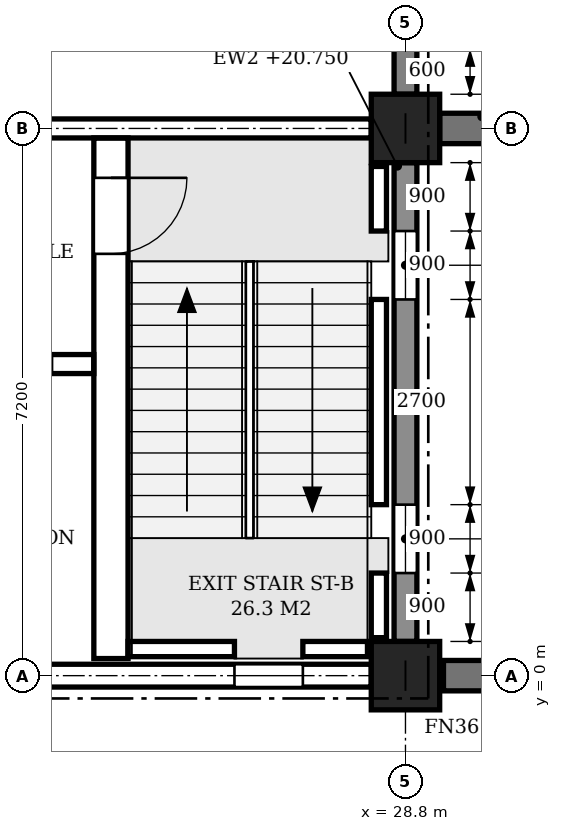
"""IFC4 building model, lengths in metres.
Left out: names, types, materials, properties, quantities, classifications, styles, units other than length and angle.
Written with IfcOpenShell. Run it as: python <this file> out.ifc"""

import sys

from ifc_helpers import new_model, si_unit, direction, frame, frame_2d, origin, origin_2d, place, context, subcontext, project, spatial, polyline, rectangle, outline, extrude, element, fill, save


model = new_model("IFC4")
c1 = context("Model", 3, precision=1e-05, world=origin(), true_north=direction((0.0, 1.0)))
c2 = subcontext(c1, "Body", "Model", "MODEL_VIEW")
j1 = project(units=[si_unit("LENGTHUNIT", "METRE"), si_unit("PLANEANGLEUNIT", "RADIAN")], contexts=[c1])
p1 = place(None, origin())
s1 = spatial("IfcSite", under=j1, at=p1, CompositionType="ELEMENT")
p2 = place(p1, origin())
s2 = spatial("IfcBuilding", under=s1, at=p2, CompositionType="ELEMENT")
p3 = place(p2, frame((0.0, 0.0, 16.8)))
s3 = spatial("IfcBuildingStorey", under=s2, at=p3, CompositionType="ELEMENT", Elevation=16.8)
for number, where, z_axis, x_axis in (
    (1, (28.8, 0.0, 0.0), (0.0, 0.0, 1.0), (1.0, 0.0, 0.0)),
    (2, (28.8, 7.2, 0.0), (0.0, 0.0, 1.0), (1.0, 0.0, 0.0)),
):
    element("IfcColumn", number, at=place(p3, frame(where, z_axis=z_axis, x_axis=x_axis)), inside=s3, PredefinedType="COLUMN", context=c2, shape_type="SweptSolid", body=[
        extrude(rectangle(XDim=0.9, YDim=0.9, at=origin_2d()), origin(), (0.0, 0.0, 1.0), 4.8),
    ])
p4 = place(p3, frame((22.05, 0.0, 0.0), z_axis=(0.0, 0.0, 1.0), x_axis=(1.0, 0.0, 0.0)))
e3 = element("IfcWall", 3, at=p4, inside=s3, PredefinedType="STANDARD", context=c2, shape_type="SweptSolid", body=[
    extrude(rectangle(XDim=6.3, YDim=0.3, at=frame_2d((3.15, 0.0))), origin(), (0.0, 0.0, 1.0), 3.95),
])
p5 = place(p4, frame((4.5, 0.0, 0.9)))
e4 = element("IfcOpeningElement", 4, at=p5, cuts=e3, PredefinedType="OPENING", context=c2, shape_type="SweptSolid", body=[
    extrude(outline(polyline([(0.0, 0.0), (0.9, 0.0), (0.9, 2.05), (0.45, 2.5), (0.0, 2.05), (0.0, 0.0)])), frame((0.0, 0.16, 0.0), z_axis=(0.0, -1.0, 0.0), x_axis=(1.0, 0.0, 0.0)), (0.0, 0.0, 1.0), 0.32),
])
p6 = place(p3, frame((28.8, 0.45, 0.0), z_axis=(0.0, 0.0, 1.0), x_axis=(0.0, 1.0, 0.0)))
e5 = element("IfcWall", 5, at=p6, inside=s3, PredefinedType="STANDARD", context=c2, shape_type="SweptSolid", body=[
    extrude(rectangle(XDim=6.3, YDim=0.3, at=frame_2d((3.15, 0.0))), origin(), (0.0, 0.0, 1.0), 3.95),
])
p7 = place(p6, frame((0.9, 0.0, 0.9)))
e6 = element("IfcOpeningElement", 6, at=p7, cuts=e5, PredefinedType="OPENING", context=c2, shape_type="SweptSolid", body=[
    extrude(outline(polyline([(0.0, 0.0), (0.9, 0.0), (0.9, 2.05), (0.45, 2.5), (0.0, 2.05), (0.0, 0.0)])), frame((0.0, 0.16, 0.0), z_axis=(0.0, -1.0, 0.0), x_axis=(1.0, 0.0, 0.0)), (0.0, 0.0, 1.0), 0.32),
])
p8 = place(p6, frame((4.5, 0.0, 0.9)))
e7 = element("IfcOpeningElement", 7, at=p8, cuts=e5, PredefinedType="OPENING", context=c2, shape_type="SweptSolid", body=[
    extrude(outline(polyline([(0.0, 0.0), (0.9, 0.0), (0.9, 2.05), (0.45, 2.5), (0.0, 2.05), (0.0, 0.0)])), frame((0.0, 0.16, 0.0), z_axis=(0.0, -1.0, 0.0), x_axis=(1.0, 0.0, 0.0)), (0.0, 0.0, 1.0), 0.32),
])
p9 = place(p3, frame((28.8, 7.65, 0.0), z_axis=(0.0, 0.0, 1.0), x_axis=(0.0, 1.0, 0.0)))
e8 = element("IfcWall", 8, at=p9, inside=s3, PredefinedType="STANDARD", context=c2, shape_type="SweptSolid", body=[
    extrude(rectangle(XDim=6.3, YDim=0.3, at=frame_2d((3.15, 0.0))), origin(), (0.0, 0.0, 1.0), 3.95),
])
p10 = place(p9, frame((0.6, 0.0, 0.9)))
e9 = element("IfcOpeningElement", 9, at=p10, cuts=e8, PredefinedType="OPENING", context=c2, shape_type="SweptSolid", body=[
    extrude(outline(polyline([(0.0, 0.0), (1.5, 0.0), (1.5, 1.75), (0.75, 2.5), (0.0, 1.75), (0.0, 0.0)])), frame((0.0, 0.16, 0.0), z_axis=(0.0, -1.0, 0.0), x_axis=(1.0, 0.0, 0.0)), (0.0, 0.0, 1.0), 0.32),
])
for number, where, z_axis, x_axis in (
    (10, (29.3, 0.0, 0.0), (0.0, 0.0, 1.0), (1.0, 0.0, 0.0)),
    (11, (29.25, 7.2, 0.0), (0.0, 0.0, 1.0), (1.0, 0.0, 0.0)),
):
    element("IfcWall", number, at=place(p3, frame(where, z_axis=z_axis, x_axis=x_axis)), inside=s3, PredefinedType="POLYGONAL", context=c2, shape_type="SweptSolid", body=[
        extrude(outline(polyline([(0.6, 0.0), (0.6, 4.55), (0.0, 4.55), (0.0, 0.0), (0.6, 0.0)])), frame((0.0, 0.2, 0.0), z_axis=(0.0, -1.0, 0.0), x_axis=(1.0, 0.0, 0.0)), (0.0, 0.0, 1.0), 0.4),
    ])
p11 = place(p3, frame((22.05, 7.2, 0.0), z_axis=(0.0, 0.0, 1.0), x_axis=(1.0, 0.0, 0.0)))
e12 = element("IfcWall", 12, at=p11, inside=s3, PredefinedType="SHEAR", context=c2, shape_type="SweptSolid", body=[
    extrude(rectangle(XDim=6.3, YDim=0.25, at=frame_2d((3.15, 0.0))), origin(), (0.0, 0.0, 1.0), 3.8),
])
p12 = place(p11, frame((0.4, 0.0, 0.0)))
e13 = element("IfcOpeningElement", 13, at=p12, cuts=e12, PredefinedType="OPENING", context=c2, shape_type="SweptSolid", body=[
    extrude(rectangle(XDim=1.1, YDim=2.1, at=frame_2d((0.55, 1.05))), frame((0.0, 0.135, 0.0), z_axis=(0.0, -1.0, 0.0), x_axis=(1.0, 0.0, 0.0)), (0.0, 0.0, 1.0), 0.27),
])
p13 = place(p3, frame((28.45, 0.5, -0.25), z_axis=(0.0, 0.0, 1.0), x_axis=(0.0, 1.0, 0.0)))
e14 = element("IfcWall", 14, at=p13, inside=s3, PredefinedType="SHEAR", context=c2, shape_type="SweptSolid", body=[
    extrude(rectangle(XDim=0.85, YDim=0.2, at=frame_2d((0.425, 0.0))), origin(), (0.0, 0.0, 1.0), 4.8),
])
p14 = place(p3, frame((28.45, 2.25, -0.25), z_axis=(0.0, 0.0, 1.0), x_axis=(0.0, 1.0, 0.0)))
e15 = element("IfcWall", 15, at=p14, inside=s3, PredefinedType="SHEAR", context=c2, shape_type="SweptSolid", body=[
    extrude(rectangle(XDim=2.7, YDim=0.2, at=frame_2d((1.35, 0.0))), origin(), (0.0, 0.0, 1.0), 4.8),
])
p15 = place(p3, frame((28.45, 5.85, -0.25), z_axis=(0.0, 0.0, 1.0), x_axis=(0.0, 1.0, 0.0)))
e16 = element("IfcWall", 16, at=p15, inside=s3, PredefinedType="SHEAR", context=c2, shape_type="SweptSolid", body=[
    extrude(rectangle(XDim=0.85, YDim=0.2, at=frame_2d((0.425, 0.0))), origin(), (0.0, 0.0, 1.0), 4.8),
])
p16 = place(p3, frame((25.15, 0.35, -0.25), z_axis=(0.0, 0.0, 1.0), x_axis=(1.0, 0.0, 0.0)))
e17 = element("IfcWall", 17, at=p16, inside=s3, PredefinedType="SHEAR", context=c2, shape_type="SweptSolid", body=[
    extrude(rectangle(XDim=1.4, YDim=0.2, at=frame_2d((0.7, 0.0))), origin(), (0.0, 0.0, 1.0), 4.8),
])
p17 = place(p3, frame((27.45, 0.35, -0.25), z_axis=(0.0, 0.0, 1.0), x_axis=(1.0, 0.0, 0.0)))
e18 = element("IfcWall", 18, at=p17, inside=s3, PredefinedType="SHEAR", context=c2, shape_type="SweptSolid", body=[
    extrude(rectangle(XDim=0.85, YDim=0.2, at=frame_2d((0.425, 0.0))), origin(), (0.0, 0.0, 1.0), 4.8),
])
p18 = place(p3, frame((24.925, 0.225, 0.0), z_axis=(0.0, 0.0, 1.0), x_axis=(0.0, 1.0, 0.0)))
e19 = element("IfcWall", 19, at=p18, inside=s3, PredefinedType="SHEAR", context=c2, shape_type="SweptSolid", body=[
    extrude(rectangle(XDim=6.85, YDim=0.45, at=frame_2d((3.425, 0.0))), origin(), (0.0, 0.0, 1.0), 4.55),
])
p19 = place(p18, frame((5.325, 0.0, 0.0)))
e20 = element("IfcOpeningElement", 20, at=p19, cuts=e19, PredefinedType="OPENING", context=c2, shape_type="SweptSolid", body=[
    extrude(rectangle(XDim=1.0, YDim=2.1, at=frame_2d((0.5, 1.05))), frame((0.0, 0.235, 0.0), z_axis=(0.0, -1.0, 0.0), x_axis=(1.0, 0.0, 0.0)), (0.0, 0.0, 1.0), 0.47),
])
p20 = place(p3, frame((21.725, 4.1, 0.0), z_axis=(0.0, 0.0, 1.0), x_axis=(1.0, 0.0, 0.0)))
e21 = element("IfcWall", 21, at=p20, inside=s3, PredefinedType="SHEAR", context=c2, shape_type="SweptSolid", body=[
    extrude(rectangle(XDim=2.975, YDim=0.25, at=frame_2d((1.487, 0.0))), origin(), (0.0, 0.0, 1.0), 4.55),
])
p21 = place(p20, frame((1.525, 0.0, 0.0)))
e22 = element("IfcOpeningElement", 22, at=p21, cuts=e21, PredefinedType="OPENING", context=c2, shape_type="SweptSolid", body=[
    extrude(rectangle(XDim=0.9, YDim=2.1, at=frame_2d((0.45, 1.05))), frame((0.0, 0.135, 0.0), z_axis=(0.0, -1.0, 0.0), x_axis=(1.0, 0.0, 0.0)), (0.0, 0.0, 1.0), 0.27),
])
p22 = place(p7, origin())
e23 = element("IfcWindow", 23, at=p22, inside=s3, PartitioningType="SINGLE_PANEL", PredefinedType="WINDOW", context=c2, shape_type="SweptSolid", body=[
    extrude(outline(polyline([(0.0, 0.0), (0.9, 0.0), (0.9, 2.05), (0.45, 2.5), (0.0, 2.05), (0.0, 0.0)])), frame((0.0, 0.03, 0.0), z_axis=(0.0, -1.0, 0.0), x_axis=(1.0, 0.0, 0.0)), (0.0, 0.0, 1.0), 0.06),
])
fill(e6, e23)
p23 = place(p8, origin())
e24 = element("IfcWindow", 24, at=p23, inside=s3, PartitioningType="SINGLE_PANEL", PredefinedType="WINDOW", context=c2, shape_type="SweptSolid", body=[
    extrude(outline(polyline([(0.0, 0.0), (0.9, 0.0), (0.9, 2.05), (0.45, 2.5), (0.0, 2.05), (0.0, 0.0)])), frame((0.0, 0.03, 0.0), z_axis=(0.0, -1.0, 0.0), x_axis=(1.0, 0.0, 0.0)), (0.0, 0.0, 1.0), 0.06),
])
fill(e7, e24)
p24 = place(p5, origin())
e25 = element("IfcWindow", 25, at=p24, inside=s3, PartitioningType="SINGLE_PANEL", PredefinedType="WINDOW", context=c2, shape_type="SweptSolid", body=[
    extrude(outline(polyline([(0.0, 0.0), (0.9, 0.0), (0.9, 2.05), (0.45, 2.5), (0.0, 2.05), (0.0, 0.0)])), frame((0.0, 0.03, 0.0), z_axis=(0.0, -1.0, 0.0), x_axis=(1.0, 0.0, 0.0)), (0.0, 0.0, 1.0), 0.06),
])
fill(e4, e25)
p25 = place(p19, frame((1.0, 0.0, 0.0), z_axis=(0.0, 0.0, 1.0), x_axis=(-1.0, 0.0, 0.0)))
e26 = element("IfcDoor", 26, at=p25, inside=s3, OperationType="SINGLE_SWING_LEFT", PredefinedType="DOOR", context=c2, shape_type="SweptSolid", body=[
    extrude(rectangle(XDim=1.0, YDim=2.1, at=frame_2d((0.5, 1.05))), frame((0.0, 0.025, 0.0), z_axis=(0.0, -1.0, 0.0), x_axis=(1.0, 0.0, 0.0)), (0.0, 0.0, 1.0), 0.05),
])
fill(e20, e26)
save(model, sys.argv[1])
